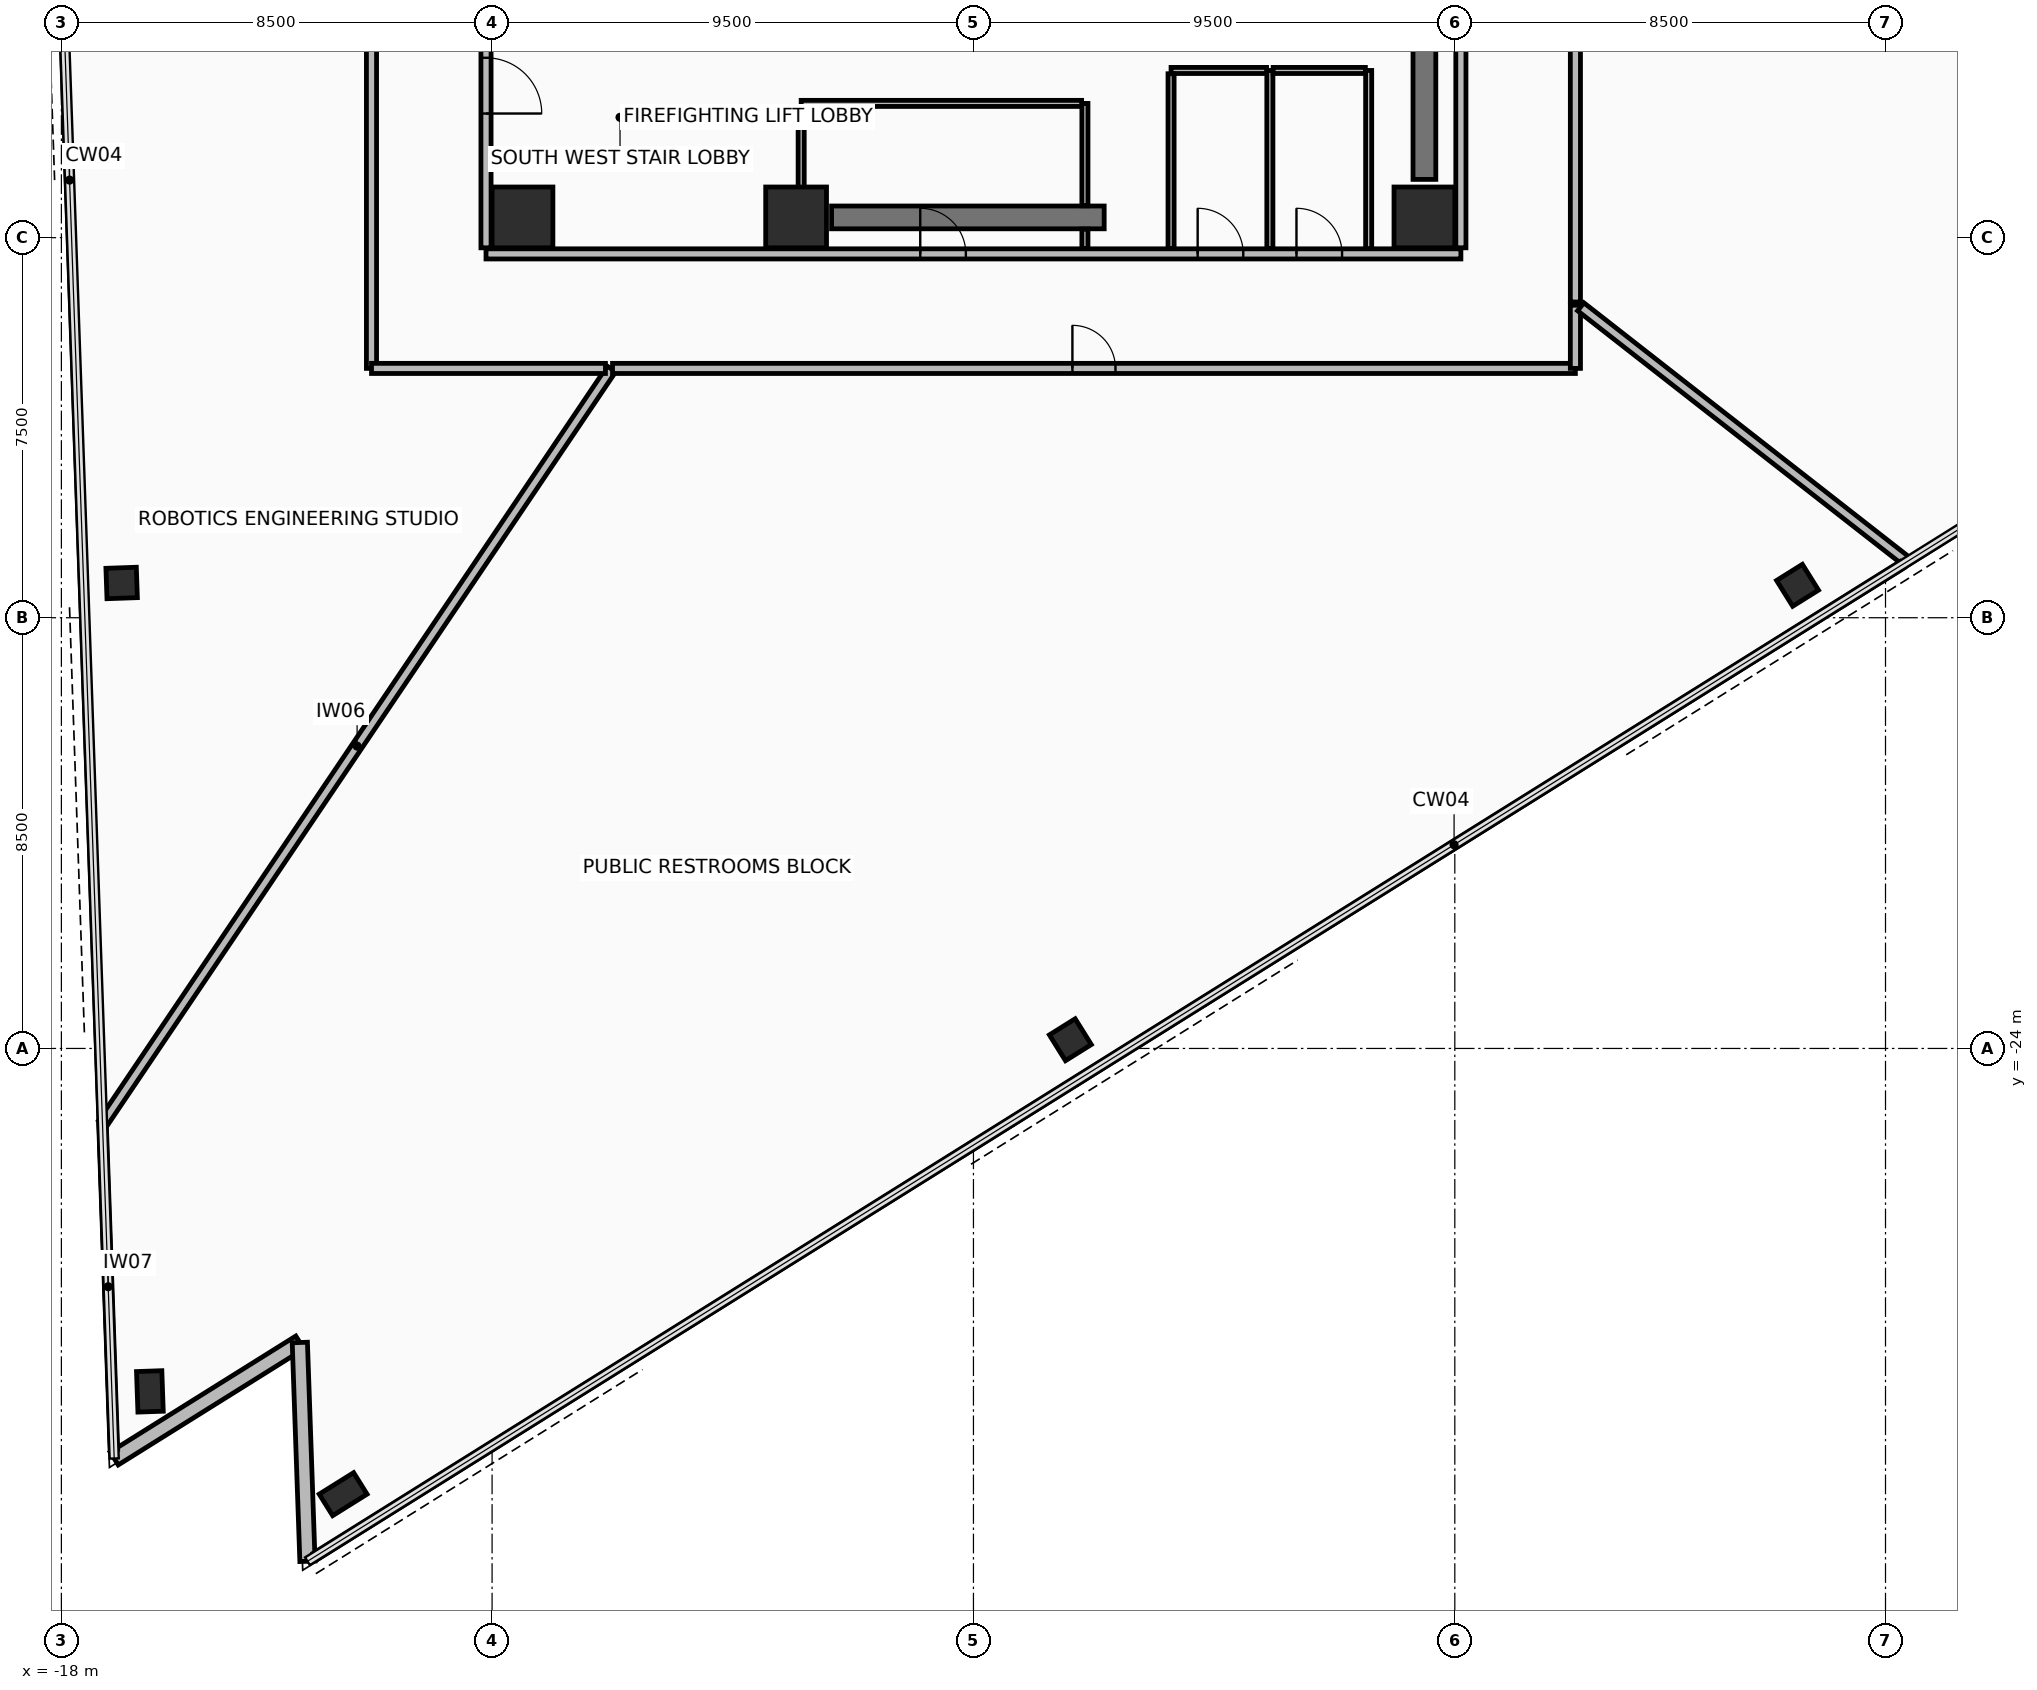
"""IFC4 building model, lengths in metres.
Left out: names, types, materials, properties, quantities, classifications, styles, units other than length and angle.
Written with IfcOpenShell. Run it as: python <this file> out.ifc"""

import sys

from ifc_helpers import new_model, si_unit, direction, frame, frame_2d, origin, origin_2d, place, context, subcontext, project, spatial, rectangle, hollow_rectangle, extrude, element, fill, save


model = new_model("IFC4")
c1 = context("Model", 3, precision=1e-05, world=origin(), true_north=direction((0.0, 1.0)))
c2 = subcontext(c1, "Body", "Model", "MODEL_VIEW")
j1 = project(units=[si_unit("LENGTHUNIT", "METRE"), si_unit("PLANEANGLEUNIT", "RADIAN")], contexts=[c1])
p1 = place(None, origin())
s1 = spatial("IfcSite", under=j1, at=p1, CompositionType="ELEMENT")
p2 = place(p1, origin())
s2 = spatial("IfcBuilding", under=s1, at=p2, CompositionType="ELEMENT")
p3 = place(p2, frame((0.0, 0.0, 160.4)))
s3 = spatial("IfcBuildingStorey", under=s2, at=p3, CompositionType="ELEMENT", Elevation=160.4)
for number, where, z_axis, x_axis in (
    (1, (-8.9, -7.6, 0.0), (0.0, 0.0, 1.0), (1.0, 0.0, 0.0)),
    (2, (-3.5, -7.6, 0.0), (0.0, 0.0, 1.0), (1.0, 0.0, 0.0)),
    (3, (8.9, -7.6, 0.0), (0.0, 0.0, 1.0), (1.0, 0.0, 0.0)),
):
    element("IfcColumn", number, at=place(p3, frame(where, z_axis=z_axis, x_axis=x_axis)), inside=s3, PredefinedType="COLUMN", context=c2, shape_type="SweptSolid", body=[
        extrude(rectangle(XDim=1.2, YDim=1.2, at=origin_2d()), origin(), (0.0, 0.0, 1.0), 4.75),
    ])
p4 = place(p3, frame((-16.811, -14.814, 0.0), z_axis=(0.0, 0.0, 1.0), x_axis=(-0.034899496703, 0.999390827019, 0.0)))
e4 = element("IfcColumn", 4, at=p4, inside=s3, PredefinedType="COLUMN", context=c2, shape_type="SweptSolid", body=[
    extrude(hollow_rectangle(XDim=0.6, YDim=0.6, WallThickness=0.036, at=origin_2d()), origin(), (0.0, 0.0, 1.0), 4.75),
])
for number, where, z_axis, x_axis in (
    (5, (-16.254, -30.768, 0.0), (0.0, 0.0, 1.0), (-0.035, 0.999, 0.0)),
    (6, (-12.439, -32.796, 0.0), (0.0, 0.0, 1.0), (0.848, 0.53, 0.0)),
):
    element("IfcColumn", number, at=place(p3, frame(where, z_axis=z_axis, x_axis=x_axis)), inside=s3, PredefinedType="COLUMN", context=c2, shape_type="SweptSolid", body=[
        extrude(hollow_rectangle(XDim=0.5, YDim=0.8, WallThickness=0.04, at=origin_2d()), origin(), (0.0, 0.0, 1.0), 4.75),
    ])
for number, where, z_axis, x_axis in (
    (7, (1.912, -23.828, 0.0), (0.0, 0.0, 1.0), (0.848, 0.53, 0.0)),
    (8, (16.264, -14.86, 0.0), (0.0, 0.0, 1.0), (0.848, 0.53, 0.0)),
):
    element("IfcColumn", number, at=place(p3, frame(where, z_axis=z_axis, x_axis=x_axis)), inside=s3, PredefinedType="COLUMN", context=c2, shape_type="SweptSolid", body=[
        extrude(hollow_rectangle(XDim=0.6, YDim=0.6, WallThickness=0.036, at=origin_2d()), origin(), (0.0, 0.0, 1.0), 4.75),
    ])
p5 = place(p3, frame((-16.958, -32.092, 0.0), z_axis=(0.0, 0.0, 1.0), x_axis=(0.848068146975, 0.529887174866, 0.0)))
e9 = element("IfcWall", 9, at=p5, inside=s3, PredefinedType="STANDARD", context=c2, shape_type="SweptSolid", body=[
    extrude(rectangle(XDim=4.32, YDim=0.3, at=frame_2d((2.16, 0.0))), origin(), (0.0, 0.0, 1.0), 2.25),
])
p6 = place(p3, frame((-13.294, -29.803, 0.0), z_axis=(0.0, 0.0, 1.0), x_axis=(0.034869079132, -0.999391888761, 0.0)))
e10 = element("IfcWall", 10, at=p6, inside=s3, PredefinedType="STANDARD", context=c2, shape_type="SweptSolid", body=[
    extrude(rectangle(XDim=4.32, YDim=0.3, at=frame_2d((2.16, 0.0))), origin(), (0.0, 0.0, 1.0), 2.25),
])
p7 = place(p3, frame((-2.8, -7.6, 0.0), z_axis=(0.0, 0.0, 1.0), x_axis=(1.0, 0.0, 0.0)))
e11 = element("IfcWall", 11, at=p7, inside=s3, PredefinedType="SHEAR", context=c2, shape_type="SweptSolid", body=[
    extrude(rectangle(XDim=5.38, YDim=0.45, at=frame_2d((2.69, 0.0))), origin(), (0.0, 0.0, 1.0), 4.555),
])
p8 = place(p3, frame((8.9, -6.85, 0.0), z_axis=(0.0, 0.0, 1.0), x_axis=(0.0, 1.0, 0.0)))
e12 = element("IfcWall", 12, at=p8, inside=s3, PredefinedType="SHEAR", context=c2, shape_type="SweptSolid", body=[
    extrude(rectangle(XDim=10.7, YDim=0.45, at=frame_2d((5.35, 0.0))), origin(), (0.0, 0.0, 1.0), 4.555),
])
p9 = place(p3, frame((-9.62, -8.32, 0.0), z_axis=(0.0, 0.0, 1.0), x_axis=(1.0, 0.0, 0.0)))
e13 = element("IfcWall", 13, at=p9, inside=s3, PredefinedType="PARTITIONING", context=c2, shape_type="SweptSolid", body=[
    extrude(rectangle(XDim=19.24, YDim=0.2, at=frame_2d((9.62, 0.0))), origin(), (0.0, 0.0, 1.0), 2.35),
])
p10 = place(p9, frame((8.57, 0.0, 0.0)))
e14 = element("IfcOpeningElement", 14, at=p10, cuts=e13, PredefinedType="OPENING", context=c2, shape_type="SweptSolid", body=[
    extrude(rectangle(XDim=0.9, YDim=2.1, at=frame_2d((0.45, 1.05))), frame((0.0, 0.11, 0.0), z_axis=(0.0, -1.0, 0.0), x_axis=(1.0, 0.0, 0.0)), (0.0, 0.0, 1.0), 0.22),
])
p11 = place(p9, frame((14.045, 0.0, 0.0)))
e15 = element("IfcOpeningElement", 15, at=p11, cuts=e13, PredefinedType="OPENING", context=c2, shape_type="SweptSolid", body=[
    extrude(rectangle(XDim=0.9, YDim=2.1, at=frame_2d((0.45, 1.05))), frame((0.0, 0.11, 0.0), z_axis=(0.0, -1.0, 0.0), x_axis=(1.0, 0.0, 0.0)), (0.0, 0.0, 1.0), 0.22),
])
p12 = place(p9, frame((15.995, 0.0, 0.0)))
e16 = element("IfcOpeningElement", 16, at=p12, cuts=e13, PredefinedType="OPENING", context=c2, shape_type="SweptSolid", body=[
    extrude(rectangle(XDim=0.9, YDim=2.1, at=frame_2d((0.45, 1.05))), frame((0.0, 0.11, 0.0), z_axis=(0.0, -1.0, 0.0), x_axis=(1.0, 0.0, 0.0)), (0.0, 0.0, 1.0), 0.22),
])
p13 = place(p3, frame((-9.62, 8.2, 0.0), z_axis=(0.0, 0.0, 1.0), x_axis=(0.0, -1.0, 0.0)))
e17 = element("IfcWall", 17, at=p13, inside=s3, PredefinedType="PARTITIONING", context=c2, shape_type="SweptSolid", body=[
    extrude(rectangle(XDim=16.4, YDim=0.2, at=frame_2d((8.2, 0.0))), origin(), (0.0, 0.0, 1.0), 2.75),
])
p14 = place(p13, frame((12.65, 0.0, 0.0)))
e18 = element("IfcOpeningElement", 18, at=p14, cuts=e17, PredefinedType="OPENING", context=c2, shape_type="SweptSolid", body=[
    extrude(rectangle(XDim=1.1, YDim=2.15, at=frame_2d((0.55, 1.075))), frame((0.0, 0.11, 0.0), z_axis=(0.0, -1.0, 0.0), x_axis=(1.0, 0.0, 0.0)), (0.0, 0.0, 1.0), 0.22),
])
p15 = place(p3, frame((9.62, -8.2, 0.0), z_axis=(0.0, 0.0, 1.0), x_axis=(0.0, 1.0, 0.0)))
e19 = element("IfcWall", 19, at=p15, inside=s3, PredefinedType="PARTITIONING", context=c2, shape_type="SweptSolid", body=[
    extrude(rectangle(XDim=16.4, YDim=0.2, at=frame_2d((8.2, 0.0))), origin(), (0.0, 0.0, 1.0), 2.35),
])
p16 = place(p15, frame((12.65, 0.0, 0.0)))
e20 = element("IfcOpeningElement", 20, at=p16, cuts=e19, PredefinedType="OPENING", context=c2, shape_type="SweptSolid", body=[
    extrude(rectangle(XDim=1.1, YDim=2.15, at=frame_2d((0.55, 1.075))), frame((0.0, 0.11, 0.0), z_axis=(0.0, -1.0, 0.0), x_axis=(1.0, 0.0, 0.0)), (0.0, 0.0, 1.0), 0.22),
])
p17 = place(p3, frame((2.2, -8.215, 0.0), z_axis=(0.0, 0.0, 1.0), x_axis=(0.0, 1.0, 0.0)))
e21 = element("IfcWall", 21, at=p17, inside=s3, PredefinedType="PARTITIONING", context=c2, shape_type="SweptSolid", body=[
    extrude(rectangle(XDim=0.385, YDim=0.12, at=frame_2d((0.192, 0.0))), origin(), (0.0, 0.0, 1.0), 3.75),
])
p18 = place(p3, frame((2.2, -7.37, 0.0), z_axis=(0.0, 0.0, 1.0), x_axis=(0.0, 1.0, 0.0)))
e22 = element("IfcWall", 22, at=p18, inside=s3, PredefinedType="PARTITIONING", context=c2, shape_type="SweptSolid", body=[
    extrude(rectangle(XDim=2.02, YDim=0.12, at=frame_2d((1.01, 0.0))), origin(), (0.0, 0.0, 1.0), 3.75),
])
p19 = place(p3, frame((2.135, -5.35, 0.0), z_axis=(0.0, 0.0, 1.0), x_axis=(-1.0, 0.0, 0.0)))
e23 = element("IfcWall", 23, at=p19, inside=s3, PredefinedType="PARTITIONING", context=c2, shape_type="SweptSolid", body=[
    extrude(rectangle(XDim=5.535, YDim=0.12, at=frame_2d((2.768, 0.0))), origin(), (0.0, 0.0, 1.0), 3.75),
])
p20 = place(p3, frame((-3.4, -5.415, 0.0), z_axis=(0.0, 0.0, 1.0), x_axis=(0.0, -1.0, 0.0)))
e24 = element("IfcWall", 24, at=p20, inside=s3, PredefinedType="PARTITIONING", context=c2, shape_type="SweptSolid", body=[
    extrude(rectangle(XDim=2.8, YDim=0.12, at=frame_2d((1.4, 0.0))), origin(), (0.0, 0.0, 1.0), 3.75),
])
p21 = place(p3, frame((5.85, -8.215, 0.0), z_axis=(0.0, 0.0, 1.0), x_axis=(0.0, 1.0, 0.0)))
e25 = element("IfcWall", 25, at=p21, inside=s3, PredefinedType="PARTITIONING", context=c2, shape_type="SweptSolid", body=[
    extrude(rectangle(XDim=3.515, YDim=0.12, at=frame_2d((1.758, 0.0))), origin(), (0.0, 0.0, 1.0), 3.75),
])
p22 = place(p3, frame((5.785, -4.7, 0.0), z_axis=(0.0, 0.0, 1.0), x_axis=(-1.0, 0.0, 0.0)))
e26 = element("IfcWall", 26, at=p22, inside=s3, PredefinedType="PARTITIONING", context=c2, shape_type="SweptSolid", body=[
    extrude(rectangle(XDim=1.885, YDim=0.12, at=frame_2d((0.942, 0.0))), origin(), (0.0, 0.0, 1.0), 4.555),
])
p23 = place(p3, frame((3.9, -4.765, 0.0), z_axis=(0.0, 0.0, 1.0), x_axis=(0.0, -1.0, 0.0)))
e27 = element("IfcWall", 27, at=p23, inside=s3, PredefinedType="PARTITIONING", context=c2, shape_type="SweptSolid", body=[
    extrude(rectangle(XDim=3.45, YDim=0.12, at=frame_2d((1.725, 0.0))), origin(), (0.0, 0.0, 1.0), 3.75),
])
p24 = place(p3, frame((7.8, -8.215, 0.0), z_axis=(0.0, 0.0, 1.0), x_axis=(0.0, 1.0, 0.0)))
e28 = element("IfcWall", 28, at=p24, inside=s3, PredefinedType="PARTITIONING", context=c2, shape_type="SweptSolid", body=[
    extrude(rectangle(XDim=3.515, YDim=0.12, at=frame_2d((1.758, 0.0))), origin(), (0.0, 0.0, 1.0), 3.75),
])
p25 = place(p3, frame((7.735, -4.7, 0.0), z_axis=(0.0, 0.0, 1.0), x_axis=(-1.0, 0.0, 0.0)))
e29 = element("IfcWall", 29, at=p25, inside=s3, PredefinedType="PARTITIONING", context=c2, shape_type="SweptSolid", body=[
    extrude(rectangle(XDim=1.82, YDim=0.12, at=frame_2d((0.91, 0.0))), origin(), (0.0, 0.0, 1.0), 4.555),
])
p26 = place(p3, frame((-16.964, -31.913, 0.0), z_axis=(0.0, 0.0, 1.0), x_axis=(-0.034878400824, 0.99939156348, 0.0)))
e30 = element("IfcWall", 30, at=p26, inside=s3, PredefinedType="PARTITIONING", context=c2, shape_type="SweptSolid", body=[
    extrude(rectangle(XDim=6.426, YDim=0.15, at=frame_2d((3.213, 0.0))), origin(), (0.0, 0.0, 1.0), 4.555),
])
p27 = place(p3, frame((-17.184, -25.476, 0.0), z_axis=(0.0, 0.0, 1.0), x_axis=(0.559194919571, 0.829036212675, 0.0)))
e31 = element("IfcWall", 31, at=p27, inside=s3, PredefinedType="PARTITIONING", context=c2, shape_type="SweptSolid", body=[
    extrude(rectangle(XDim=17.955, YDim=0.2, at=frame_2d((8.978, 0.0))), origin(), (0.0, 0.0, 1.0), 2.25),
])
p28 = place(p3, frame((-7.123, -10.58, 0.0), z_axis=(0.0, 0.0, 1.0), x_axis=(1.0, 0.0, 0.0)))
e32 = element("IfcWall", 32, at=p28, inside=s3, PredefinedType="PARTITIONING", context=c2, shape_type="SweptSolid", body=[
    extrude(rectangle(XDim=19.002, YDim=0.2, at=frame_2d((9.501, 0.0))), origin(), (0.0, 0.0, 1.0), 2.35),
])
p29 = place(p28, frame((9.076, 0.0, 0.0)))
e33 = element("IfcOpeningElement", 33, at=p29, cuts=e32, PredefinedType="OPENING", context=c2, shape_type="SweptSolid", body=[
    extrude(rectangle(XDim=0.85, YDim=2.1, at=frame_2d((0.425, 1.05))), frame((0.0, 0.11, 0.0), z_axis=(0.0, -1.0, 0.0), x_axis=(1.0, 0.0, 0.0)), (0.0, 0.0, 1.0), 0.22),
])
p30 = place(p3, frame((11.88, -10.579, 0.0), z_axis=(0.0, 0.0, 1.0), x_axis=(0.0, 1.0, 0.0)))
e34 = element("IfcWall", 34, at=p30, inside=s3, PredefinedType="PARTITIONING", context=c2, shape_type="SweptSolid", body=[
    extrude(rectangle(XDim=1.246, YDim=0.2, at=frame_2d((0.623, 0.0))), origin(), (0.0, 0.0, 1.0), 2.75),
])
p31 = place(p3, frame((11.985, -9.364, 0.0), z_axis=(0.0, 0.0, 1.0), x_axis=(0.7880166733, -0.615653898389, 0.0)))
e35 = element("IfcWall", 35, at=p31, inside=s3, PredefinedType="PARTITIONING", context=c2, shape_type="SweptSolid", body=[
    extrude(rectangle(XDim=8.171, YDim=0.2, at=frame_2d((4.086, 0.0))), origin(), (0.0, 0.0, 1.0), 2.25),
])
p32 = place(p3, frame((18.33, -14.454, 0.0), z_axis=(0.0, 0.0, 1.0), x_axis=(-0.848050291152, -0.52991575149, 0.0)))
e36 = element("IfcWall", 36, at=p32, inside=s3, PredefinedType="PARTITIONING", context=c2, shape_type="SweptSolid", body=[
    extrude(rectangle(XDim=36.933, YDim=0.15, at=frame_2d((18.467, 0.0))), origin(), (0.0, 0.0, 1.0), 2.35),
])
p33 = place(p3, frame((-11.88, 6.844, 0.0), z_axis=(0.0, 0.0, 1.0), x_axis=(0.0, -1.0, 0.0)))
e37 = element("IfcWall", 37, at=p33, inside=s3, PredefinedType="PARTITIONING", context=c2, shape_type="SweptSolid", body=[
    extrude(rectangle(XDim=17.424, YDim=0.2, at=frame_2d((8.712, 0.0))), origin(), (0.0, 0.0, 1.0), 2.75),
])
p34 = place(p33, frame((8.212, 0.0, 0.0)))
e38 = element("IfcOpeningElement", 38, at=p34, cuts=e37, PredefinedType="OPENING", context=c2, shape_type="SweptSolid", body=[
    extrude(rectangle(XDim=1.0, YDim=2.15, at=frame_2d((0.5, 1.075))), frame((0.0, 0.11, 0.0), z_axis=(0.0, -1.0, 0.0), x_axis=(1.0, 0.0, 0.0)), (0.0, 0.0, 1.0), 0.22),
])
p35 = place(p3, frame((-11.879, -10.58, 0.0), z_axis=(0.0, 0.0, 1.0), x_axis=(1.0, 0.0, 0.0)))
e39 = element("IfcWall", 39, at=p35, inside=s3, PredefinedType="PARTITIONING", context=c2, shape_type="SweptSolid", body=[
    extrude(rectangle(XDim=4.616, YDim=0.2, at=frame_2d((2.308, 0.0))), origin(), (0.0, 0.0, 1.0), 2.35),
])
p36 = place(p3, frame((11.88, -9.27, 0.0), z_axis=(0.0, 0.0, 1.0), x_axis=(0.0, 1.0, 0.0)))
e40 = element("IfcWall", 40, at=p36, inside=s3, PredefinedType="PARTITIONING", context=c2, shape_type="SweptSolid", body=[
    extrude(rectangle(XDim=18.426, YDim=0.2, at=frame_2d((9.213, 0.0))), origin(), (0.0, 0.0, 1.0), 2.25),
])
p37 = place(p36, frame((8.763, 0.0, 0.0)))
e41 = element("IfcOpeningElement", 41, at=p37, cuts=e40, PredefinedType="OPENING", context=c2, shape_type="SweptSolid", body=[
    extrude(rectangle(XDim=0.9, YDim=2.1, at=frame_2d((0.45, 1.05))), frame((0.0, 0.11, 0.0), z_axis=(0.0, -1.0, 0.0), x_axis=(1.0, 0.0, 0.0)), (0.0, 0.0, 1.0), 0.22),
])
p38 = place(p14, frame((1.1, 0.0, 0.0), z_axis=(0.0, 0.0, 1.0), x_axis=(-1.0, 0.0, 0.0)))
e42 = element("IfcDoor", 42, at=p38, inside=s3, OperationType="SINGLE_SWING_LEFT", PredefinedType="DOOR", context=c2, shape_type="SweptSolid", body=[
    extrude(rectangle(XDim=1.1, YDim=2.15, at=frame_2d((0.55, 1.075))), frame((0.0, 0.025, 0.0), z_axis=(0.0, -1.0, 0.0), x_axis=(1.0, 0.0, 0.0)), (0.0, 0.0, 1.0), 0.05),
])
fill(e18, e42)
p39 = place(p10, origin())
e43 = element("IfcDoor", 43, at=p39, inside=s3, OperationType="SINGLE_SWING_LEFT", PredefinedType="DOOR", context=c2, shape_type="SweptSolid", body=[
    extrude(rectangle(XDim=0.9, YDim=2.1, at=frame_2d((0.45, 1.05))), frame((0.0, 0.025, 0.0), z_axis=(0.0, -1.0, 0.0), x_axis=(1.0, 0.0, 0.0)), (0.0, 0.0, 1.0), 0.05),
])
fill(e14, e43)
p40 = place(p11, origin())
e44 = element("IfcDoor", 44, at=p40, inside=s3, OperationType="SINGLE_SWING_LEFT", PredefinedType="DOOR", context=c2, shape_type="SweptSolid", body=[
    extrude(rectangle(XDim=0.9, YDim=2.1, at=frame_2d((0.45, 1.05))), frame((0.0, 0.025, 0.0), z_axis=(0.0, -1.0, 0.0), x_axis=(1.0, 0.0, 0.0)), (0.0, 0.0, 1.0), 0.05),
])
fill(e15, e44)
p41 = place(p12, origin())
e45 = element("IfcDoor", 45, at=p41, inside=s3, OperationType="SINGLE_SWING_LEFT", PredefinedType="DOOR", context=c2, shape_type="SweptSolid", body=[
    extrude(rectangle(XDim=0.9, YDim=2.1, at=frame_2d((0.45, 1.05))), frame((0.0, 0.025, 0.0), z_axis=(0.0, -1.0, 0.0), x_axis=(1.0, 0.0, 0.0)), (0.0, 0.0, 1.0), 0.05),
])
fill(e16, e45)
p42 = place(p29, origin())
e46 = element("IfcDoor", 46, at=p42, inside=s3, OperationType="SINGLE_SWING_RIGHT", PredefinedType="DOOR", context=c2, shape_type="SweptSolid", body=[
    extrude(rectangle(XDim=0.85, YDim=2.1, at=frame_2d((0.425, 1.05))), frame((0.0, 0.025, 0.0), z_axis=(0.0, -1.0, 0.0), x_axis=(1.0, 0.0, 0.0)), (0.0, 0.0, 1.0), 0.05),
])
fill(e33, e46)
save(model, sys.argv[1])
